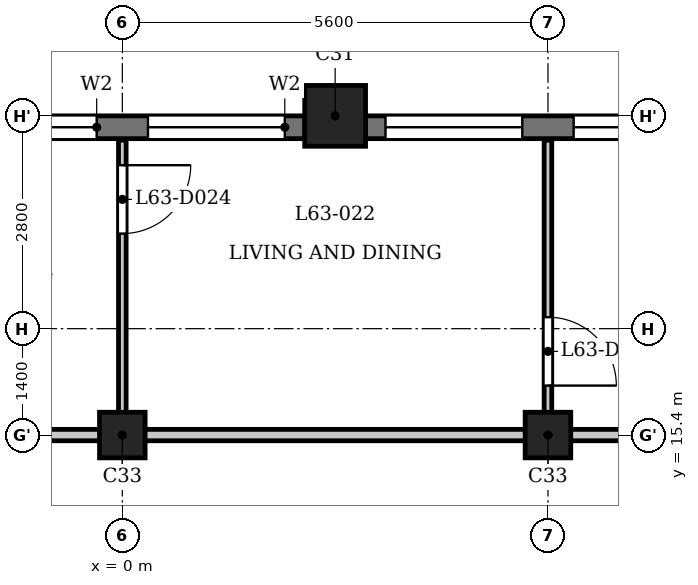
"""IFC4 building model, lengths in metres.
Left out: names, types, materials, properties, quantities, classifications, styles, units other than length and angle.
Written with IfcOpenShell. Run it as: python <this file> out.ifc"""

import sys

from ifc_helpers import new_model, si_unit, direction, frame, frame_2d, origin, origin_2d, place, context, subcontext, project, spatial, rectangle, extrude, element, fill, save


model = new_model("IFC4")
c1 = context("Model", 3, precision=1e-05, world=origin(), true_north=direction((0.0, 1.0)))
c2 = subcontext(c1, "Body", "Model", "MODEL_VIEW")
j1 = project(units=[si_unit("LENGTHUNIT", "METRE"), si_unit("PLANEANGLEUNIT", "RADIAN")], contexts=[c1])
p1 = place(None, origin())
s1 = spatial("IfcSite", under=j1, at=p1, CompositionType="ELEMENT")
p2 = place(p1, origin())
s2 = spatial("IfcBuilding", under=s1, at=p2, CompositionType="ELEMENT")
p3 = place(p2, frame((0.0, 0.0, 245.2)))
s3 = spatial("IfcBuildingStorey", under=s2, at=p3, CompositionType="ELEMENT", Elevation=245.2)
p4 = place(p3, frame((2.8, 19.6, 0.0), z_axis=(0.0, 0.0, 1.0), x_axis=(1.0, 0.0, 0.0)))
e1 = element("IfcColumn", 1, at=p4, inside=s3, PredefinedType="COLUMN", context=c2, shape_type="SweptSolid", body=[
    extrude(rectangle(XDim=0.8, YDim=0.8, at=origin_2d()), origin(), (0.0, 0.0, 1.0), 3.5),
])
for number, where, z_axis, x_axis in (
    (2, (0.0, 15.4, 0.0), (0.0, 0.0, 1.0), (1.0, 0.0, 0.0)),
    (3, (5.6, 15.4, 0.0), (0.0, 0.0, 1.0), (1.0, 0.0, 0.0)),
):
    element("IfcColumn", number, at=place(p3, frame(where, z_axis=z_axis, x_axis=x_axis)), inside=s3, PredefinedType="COLUMN", context=c2, shape_type="SweptSolid", body=[
        extrude(rectangle(XDim=0.6, YDim=0.6, at=origin_2d()), origin(), (0.0, 0.0, 1.0), 3.5),
    ])
p5 = place(p3, frame((8.0, 19.45, 0.0), z_axis=(0.0, 0.0, 1.0), x_axis=(-1.0, 0.0, 0.0)))
e4 = element("IfcWall", 4, at=p5, inside=s3, PredefinedType="SOLIDWALL", context=c2, shape_type="SweptSolid", body=[
    extrude(rectangle(XDim=4.8, YDim=0.3, at=frame_2d((2.4, 0.0))), origin(), (0.0, 0.0, 1.0), 2.55),
])
p6 = place(p5, frame((0.262, 0.0, 0.9)))
e5 = element("IfcOpeningElement", 5, at=p6, cuts=e4, PredefinedType="OPENING", context=c2, shape_type="SweptSolid", body=[
    extrude(rectangle(XDim=1.8, YDim=1.25, at=frame_2d((0.9, 0.625))), frame((0.0, 0.16, 0.0), z_axis=(0.0, -1.0, 0.0), x_axis=(1.0, 0.0, 0.0)), (0.0, 0.0, 1.0), 0.32),
])
p7 = place(p5, frame((2.738, 0.0, 0.9)))
e6 = element("IfcOpeningElement", 6, at=p7, cuts=e4, PredefinedType="OPENING", context=c2, shape_type="SweptSolid", body=[
    extrude(rectangle(XDim=1.8, YDim=1.25, at=frame_2d((0.9, 0.625))), frame((0.0, 0.16, 0.0), z_axis=(0.0, -1.0, 0.0), x_axis=(1.0, 0.0, 0.0)), (0.0, 0.0, 1.0), 0.32),
])
p8 = place(p3, frame((2.4, 19.45, 0.0), z_axis=(0.0, 0.0, 1.0), x_axis=(-1.0, 0.0, 0.0)))
e7 = element("IfcWall", 7, at=p8, inside=s3, PredefinedType="SOLIDWALL", context=c2, shape_type="SweptSolid", body=[
    extrude(rectangle(XDim=4.8, YDim=0.3, at=frame_2d((2.4, 0.0))), origin(), (0.0, 0.0, 1.0), 2.55),
])
p9 = place(p8, frame((0.262, 0.0, 0.9)))
e8 = element("IfcOpeningElement", 8, at=p9, cuts=e7, PredefinedType="OPENING", context=c2, shape_type="SweptSolid", body=[
    extrude(rectangle(XDim=1.8, YDim=1.25, at=frame_2d((0.9, 0.625))), frame((0.0, 0.16, 0.0), z_axis=(0.0, -1.0, 0.0), x_axis=(1.0, 0.0, 0.0)), (0.0, 0.0, 1.0), 0.32),
])
p10 = place(p8, frame((2.738, 0.0, 0.9)))
e9 = element("IfcOpeningElement", 9, at=p10, cuts=e7, PredefinedType="OPENING", context=c2, shape_type="SweptSolid", body=[
    extrude(rectangle(XDim=1.8, YDim=1.25, at=frame_2d((0.9, 0.625))), frame((0.0, 0.16, 0.0), z_axis=(0.0, -1.0, 0.0), x_axis=(1.0, 0.0, 0.0)), (0.0, 0.0, 1.0), 0.32),
])
p11 = place(p3, frame((-23.55, 15.4, 0.0), z_axis=(0.0, 0.0, 1.0), x_axis=(1.0, 0.0, 0.0)))
e10 = element("IfcWall", 10, at=p11, inside=s3, PredefinedType="PARTITIONING", context=c2, shape_type="SweptSolid", body=[
    extrude(rectangle(XDim=46.872, YDim=0.15, at=frame_2d((23.436, 0.0))), origin(), (0.0, 0.0, 1.0), 3.2),
])
p12 = place(p11, frame((12.9, 0.0, 0.0)))
e11 = element("IfcOpeningElement", 11, at=p12, cuts=e10, PredefinedType="OPENING", context=c2, shape_type="SweptSolid", body=[
    extrude(rectangle(XDim=1.0, YDim=2.1, at=frame_2d((0.5, 1.05))), frame((0.0, 0.085, 0.0), z_axis=(0.0, -1.0, 0.0), x_axis=(1.0, 0.0, 0.0)), (0.0, 0.0, 1.0), 0.17),
])
p13 = place(p11, frame((20.9, 0.0, 0.0)))
e12 = element("IfcOpeningElement", 12, at=p13, cuts=e10, PredefinedType="OPENING", context=c2, shape_type="SweptSolid", body=[
    extrude(rectangle(XDim=1.0, YDim=2.1, at=frame_2d((0.5, 1.05))), frame((0.0, 0.085, 0.0), z_axis=(0.0, -1.0, 0.0), x_axis=(1.0, 0.0, 0.0)), (0.0, 0.0, 1.0), 0.17),
])
p14 = place(p11, frame((37.7, 0.0, 0.0)))
e13 = element("IfcOpeningElement", 13, at=p14, cuts=e10, PredefinedType="OPENING", context=c2, shape_type="SweptSolid", body=[
    extrude(rectangle(XDim=1.0, YDim=2.1, at=frame_2d((0.5, 1.05))), frame((0.0, 0.085, 0.0), z_axis=(0.0, -1.0, 0.0), x_axis=(1.0, 0.0, 0.0)), (0.0, 0.0, 1.0), 0.17),
])
p15 = place(p3, frame((0.0, 15.475, 0.0), z_axis=(0.0, 0.0, 1.0), x_axis=(0.0, 1.0, 0.0)))
e14 = element("IfcWall", 14, at=p15, inside=s3, PredefinedType="PARTITIONING", context=c2, shape_type="SweptSolid", body=[
    extrude(rectangle(XDim=3.805, YDim=0.1, at=frame_2d((1.902, 0.0))), origin(), (0.0, 0.0, 1.0), 3.2),
])
p16 = place(p15, frame((2.576, 0.0, 0.0)))
e15 = element("IfcOpeningElement", 15, at=p16, cuts=e14, PredefinedType="OPENING", context=c2, shape_type="SweptSolid", body=[
    extrude(rectangle(XDim=0.9, YDim=2.1, at=frame_2d((0.45, 1.05))), frame((0.0, 0.06, 0.0), z_axis=(0.0, -1.0, 0.0), x_axis=(1.0, 0.0, 0.0)), (0.0, 0.0, 1.0), 0.12),
])
p17 = place(p3, frame((5.6, 15.475, 0.0), z_axis=(0.0, 0.0, 1.0), x_axis=(0.0, 1.0, 0.0)))
e16 = element("IfcWall", 16, at=p17, inside=s3, PredefinedType="PARTITIONING", context=c2, shape_type="SweptSolid", body=[
    extrude(rectangle(XDim=3.805, YDim=0.1, at=frame_2d((1.902, 0.0))), origin(), (0.0, 0.0, 1.0), 3.2),
])
p18 = place(p17, frame((0.576, 0.0, 0.0)))
e17 = element("IfcOpeningElement", 17, at=p18, cuts=e16, PredefinedType="OPENING", context=c2, shape_type="SweptSolid", body=[
    extrude(rectangle(XDim=0.9, YDim=2.1, at=frame_2d((0.45, 1.05))), frame((0.0, 0.06, 0.0), z_axis=(0.0, -1.0, 0.0), x_axis=(1.0, 0.0, 0.0)), (0.0, 0.0, 1.0), 0.12),
])
p19 = place(p16, origin())
e18 = element("IfcDoor", 18, at=p19, inside=s3, OperationType="SINGLE_SWING_RIGHT", PredefinedType="DOOR", context=c2, shape_type="SweptSolid", body=[
    extrude(rectangle(XDim=0.9, YDim=2.1, at=frame_2d((0.45, 1.05))), frame((0.0, 0.025, 0.0), z_axis=(0.0, -1.0, 0.0), x_axis=(1.0, 0.0, 0.0)), (0.0, 0.0, 1.0), 0.05),
])
fill(e15, e18)
p20 = place(p18, origin())
e19 = element("IfcDoor", 19, at=p20, inside=s3, OperationType="SINGLE_SWING_LEFT", PredefinedType="DOOR", context=c2, shape_type="SweptSolid", body=[
    extrude(rectangle(XDim=0.9, YDim=2.1, at=frame_2d((0.45, 1.05))), frame((0.0, 0.025, 0.0), z_axis=(0.0, -1.0, 0.0), x_axis=(1.0, 0.0, 0.0)), (0.0, 0.0, 1.0), 0.05),
])
fill(e17, e19)
p21 = place(p6, origin())
e20 = element("IfcWindow", 20, at=p21, inside=s3, PartitioningType="SINGLE_PANEL", PredefinedType="WINDOW", context=c2, shape_type="SweptSolid", body=[
    extrude(rectangle(XDim=1.8, YDim=1.25, at=frame_2d((0.9, 0.625))), frame((0.0, 0.03, 0.0), z_axis=(0.0, -1.0, 0.0), x_axis=(1.0, 0.0, 0.0)), (0.0, 0.0, 1.0), 0.06),
])
fill(e5, e20)
p22 = place(p7, origin())
e21 = element("IfcWindow", 21, at=p22, inside=s3, PartitioningType="SINGLE_PANEL", PredefinedType="WINDOW", context=c2, shape_type="SweptSolid", body=[
    extrude(rectangle(XDim=1.8, YDim=1.25, at=frame_2d((0.9, 0.625))), frame((0.0, 0.03, 0.0), z_axis=(0.0, -1.0, 0.0), x_axis=(1.0, 0.0, 0.0)), (0.0, 0.0, 1.0), 0.06),
])
fill(e6, e21)
p23 = place(p9, origin())
e22 = element("IfcWindow", 22, at=p23, inside=s3, PartitioningType="SINGLE_PANEL", PredefinedType="WINDOW", context=c2, shape_type="SweptSolid", body=[
    extrude(rectangle(XDim=1.8, YDim=1.25, at=frame_2d((0.9, 0.625))), frame((0.0, 0.03, 0.0), z_axis=(0.0, -1.0, 0.0), x_axis=(1.0, 0.0, 0.0)), (0.0, 0.0, 1.0), 0.06),
])
fill(e8, e22)
p24 = place(p10, origin())
e23 = element("IfcWindow", 23, at=p24, inside=s3, PartitioningType="SINGLE_PANEL", PredefinedType="WINDOW", context=c2, shape_type="SweptSolid", body=[
    extrude(rectangle(XDim=1.8, YDim=1.25, at=frame_2d((0.9, 0.625))), frame((0.0, 0.03, 0.0), z_axis=(0.0, -1.0, 0.0), x_axis=(1.0, 0.0, 0.0)), (0.0, 0.0, 1.0), 0.06),
])
fill(e9, e23)
save(model, sys.argv[1])
